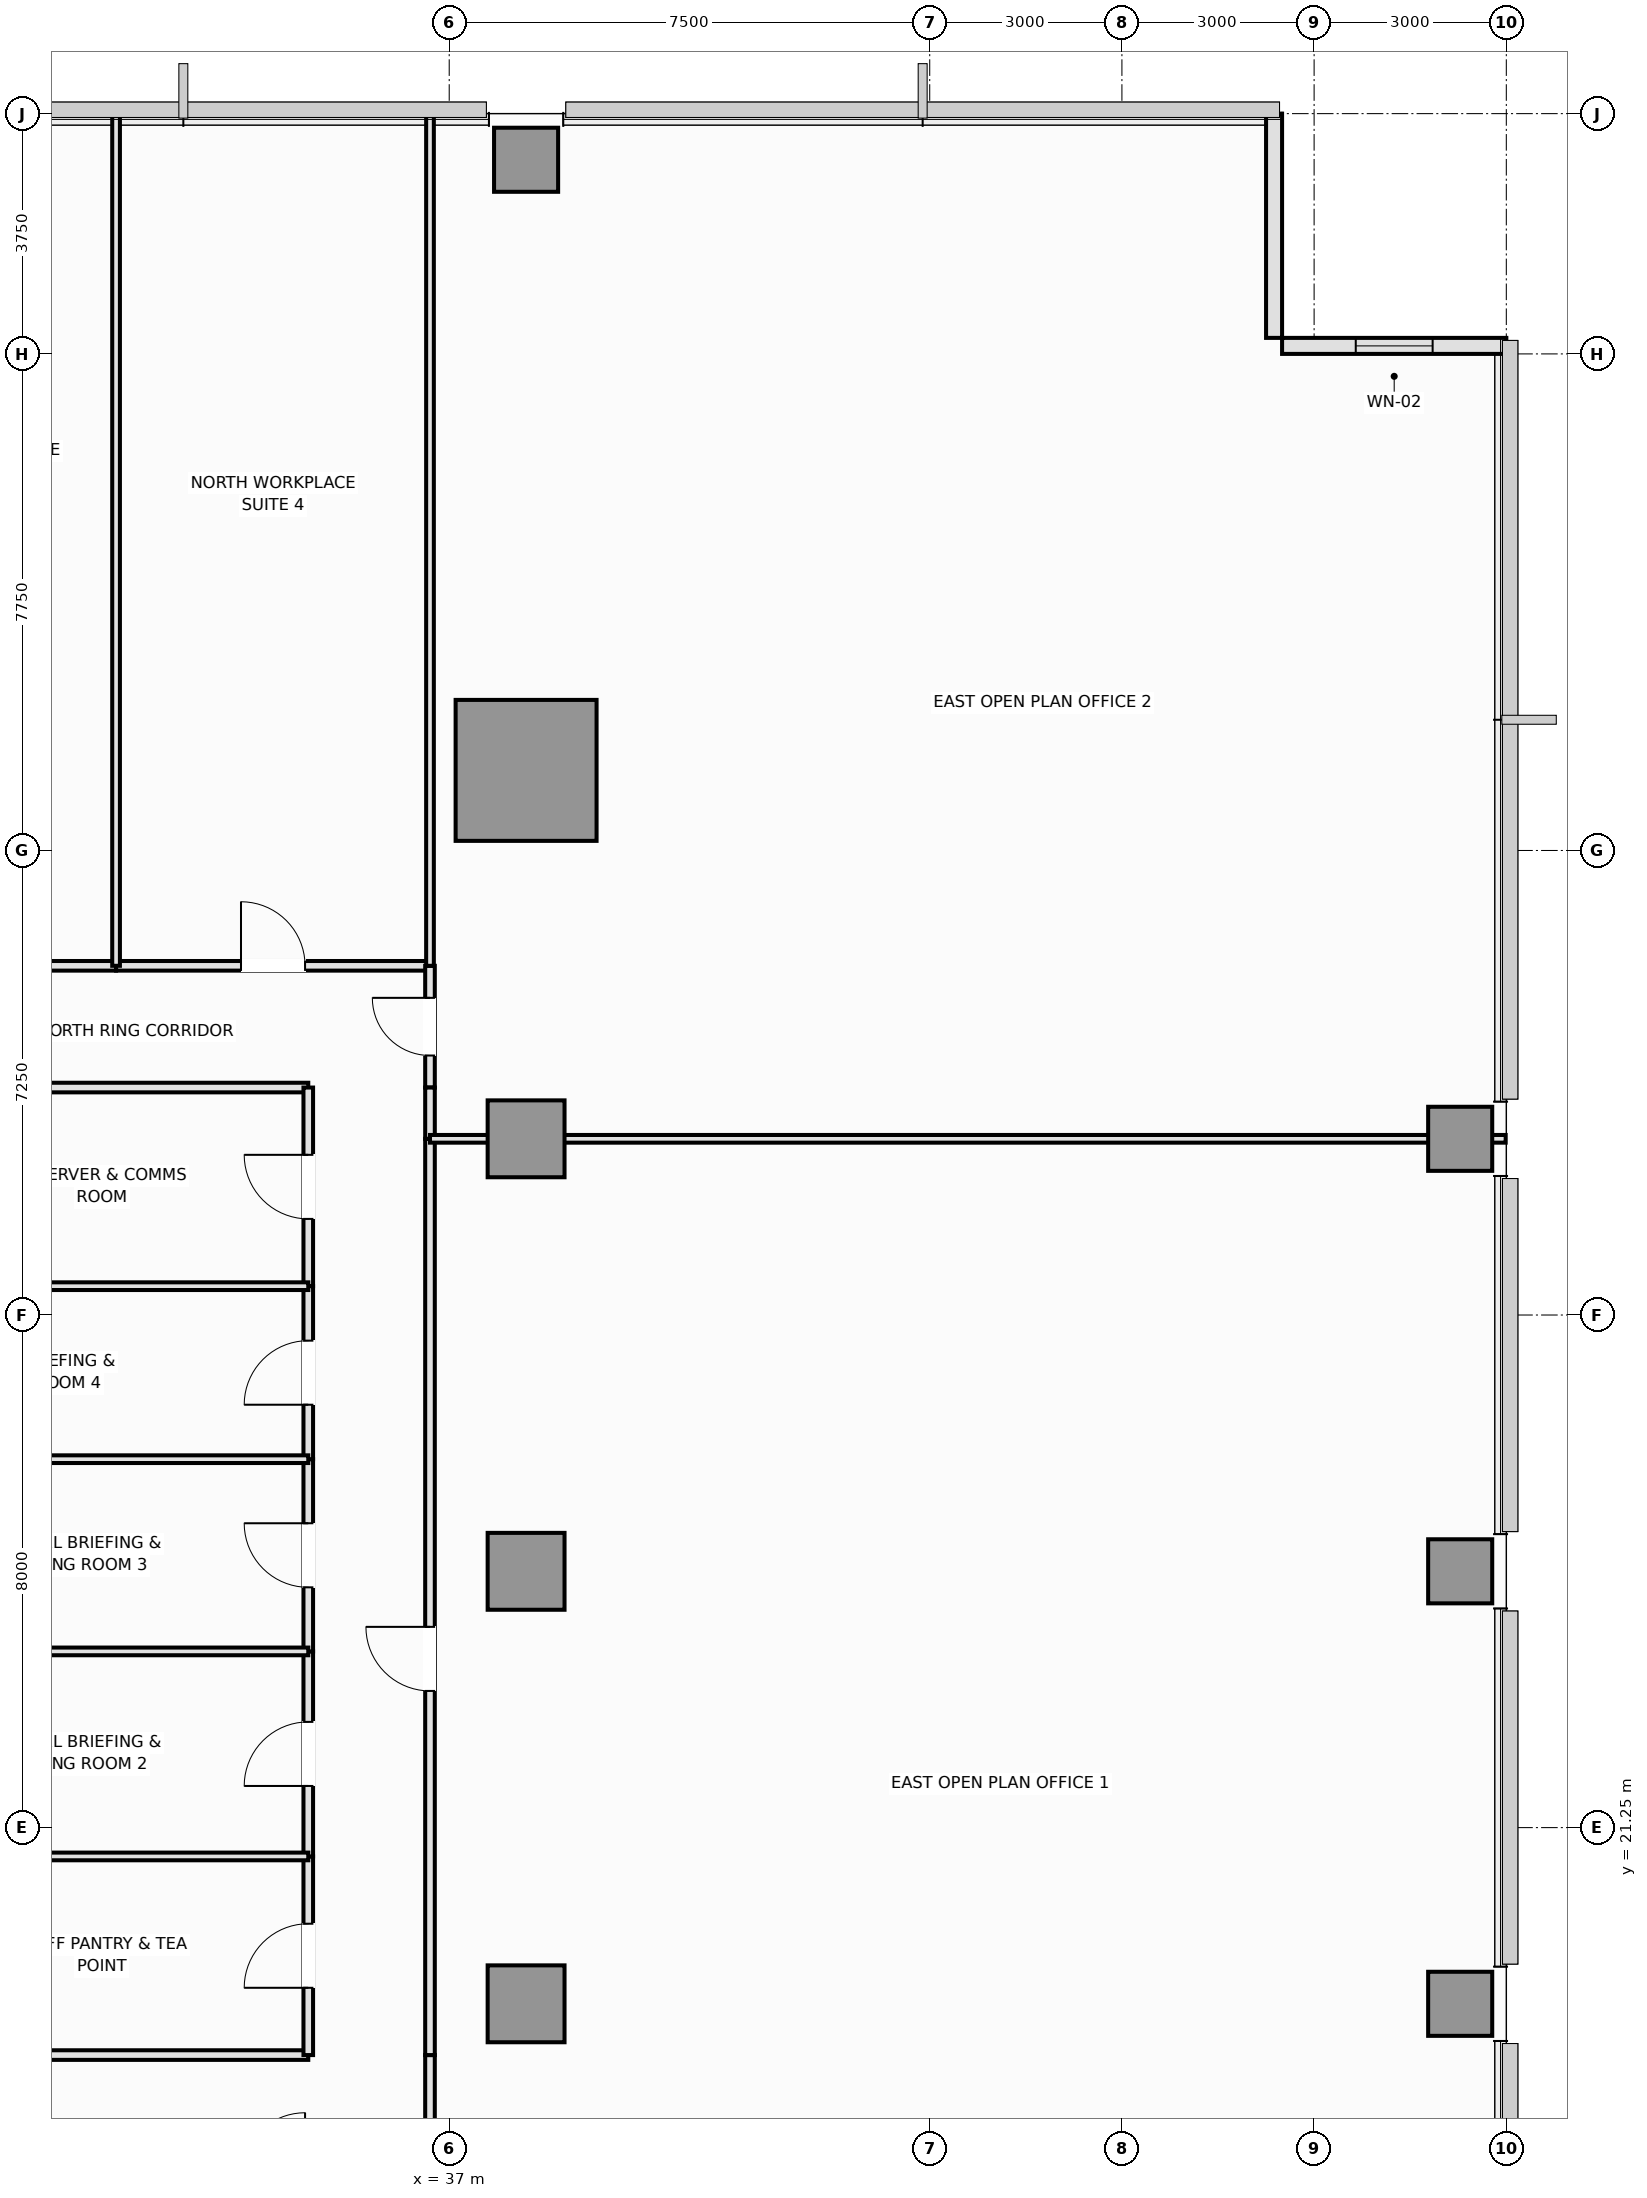
"""IFC4 building model, lengths in metres.
Left out: names, types, materials, properties, quantities, classifications, styles, units other than length and angle.
Written with IfcOpenShell. Run it as: python <this file> out.ifc"""

import sys

from ifc_helpers import new_model, si_unit, direction, frame, frame_2d, origin, origin_2d, place, context, subcontext, project, spatial, rectangle, extrude, element, fill, save


model = new_model("IFC4")
c1 = context("Model", 3, precision=1e-05, world=origin(), true_north=direction((0.0, 1.0)))
c2 = subcontext(c1, "Body", "Model", "MODEL_VIEW")
j1 = project(units=[si_unit("LENGTHUNIT", "METRE"), si_unit("PLANEANGLEUNIT", "RADIAN")], contexts=[c1])
p1 = place(None, origin())
s1 = spatial("IfcSite", under=j1, at=p1, CompositionType="ELEMENT")
p2 = place(p1, origin())
s2 = spatial("IfcBuilding", under=s1, at=p2, CompositionType="ELEMENT")
p3 = place(p2, frame((0.0, 0.0, 68.2)))
s3 = spatial("IfcBuildingStorey", under=s2, at=p3, CompositionType="ELEMENT", Elevation=68.2)
p4 = place(p3, frame((38.2, 37.75, 0.0), z_axis=(0.0, 0.0, 1.0), x_axis=(1.0, 0.0, 0.0)))
e1 = element("IfcColumn", 1, at=p4, inside=s3, PredefinedType="COLUMN", context=c2, shape_type="SweptSolid", body=[
    extrude(rectangle(XDim=2.2, YDim=2.2, at=origin_2d()), origin(), (0.0, 0.0, 1.0), 3.55),
])
for number, where, z_axis, x_axis in (
    (2, (38.2, 18.5, 0.0), (0.0, 0.0, 1.0), (1.0, 0.0, 0.0)),
    (3, (38.2, 25.25, 0.0), (0.0, 0.0, 1.0), (1.0, 0.0, 0.0)),
    (4, (38.2, 32.0, 0.0), (0.0, 0.0, 1.0), (1.0, 0.0, 0.0)),
):
    element("IfcColumn", number, at=place(p3, frame(where, z_axis=z_axis, x_axis=x_axis)), inside=s3, PredefinedType="COLUMN", context=c2, shape_type="SweptSolid", body=[
        extrude(rectangle(XDim=1.2, YDim=1.2, at=origin_2d()), origin(), (0.0, 0.0, 1.0), 3.55),
    ])
for number, where, z_axis, x_axis in (
    (5, (52.78, 18.5, 0.0), (0.0, 0.0, 1.0), (1.0, 0.0, 0.0)),
    (6, (52.78, 25.25, 0.0), (0.0, 0.0, 1.0), (1.0, 0.0, 0.0)),
    (7, (52.78, 32.0, 0.0), (0.0, 0.0, 1.0), (1.0, 0.0, 0.0)),
    (8, (38.2, 47.28, 0.0), (0.0, 0.0, 1.0), (1.0, 0.0, 0.0)),
):
    element("IfcColumn", number, at=place(p3, frame(where, z_axis=z_axis, x_axis=x_axis)), inside=s3, PredefinedType="COLUMN", context=c2, shape_type="SweptSolid", body=[
        extrude(rectangle(XDim=1.0, YDim=1.0, at=origin_2d()), origin(), (0.0, 0.0, 1.0), 3.55),
    ])
p5 = place(p3, frame((53.5, 44.375, 0.0), z_axis=(0.0, 0.0, 1.0), x_axis=(-1.0, 0.0, 0.0)))
e9 = element("IfcWall", 9, at=p5, inside=s3, PredefinedType="SOLIDWALL", context=c2, shape_type="SweptSolid", body=[
    extrude(rectangle(XDim=3.5, YDim=0.25, at=frame_2d((1.75, 0.0))), origin(), (0.0, 0.0, 1.0), 3.37),
])
p6 = place(p5, frame((1.15, 0.0, 0.9)))
e10 = element("IfcOpeningElement", 10, at=p6, cuts=e9, PredefinedType="OPENING", context=c2, shape_type="SweptSolid", body=[
    extrude(rectangle(XDim=1.2, YDim=1.8, at=frame_2d((0.6, 0.9))), frame((0.0, 0.135, 0.0), z_axis=(0.0, -1.0, 0.0), x_axis=(1.0, 0.0, 0.0)), (0.0, 0.0, 1.0), 0.27),
])
p7 = place(p3, frame((49.875, 44.5, 0.0), z_axis=(0.0, 0.0, 1.0), x_axis=(0.0, 1.0, 0.0)))
e11 = element("IfcWall", 11, at=p7, inside=s3, PredefinedType="SOLIDWALL", context=c2, shape_type="SweptSolid", body=[
    extrude(rectangle(XDim=3.5, YDim=0.25, at=frame_2d((1.75, 0.0))), origin(), (0.0, 0.0, 1.0), 3.37),
])
p8 = place(p3, frame((29.8, 17.7, 0.0), z_axis=(0.0, 0.0, 1.0), x_axis=(1.0, 0.0, 0.0)))
e12 = element("IfcWall", 12, at=p8, inside=s3, PredefinedType="PARTITIONING", context=c2, shape_type="SweptSolid", body=[
    extrude(rectangle(XDim=5.0, YDim=0.15, at=frame_2d((2.5, 0.0))), origin(), (0.0, 0.0, 1.0), 3.37),
])
p9 = place(p3, frame((36.7, 15.8, 0.0), z_axis=(0.0, 0.0, 1.0), x_axis=(0.0, 1.0, 0.0)))
e13 = element("IfcWall", 13, at=p9, inside=s3, PredefinedType="PARTITIONING", context=c2, shape_type="SweptSolid", body=[
    extrude(rectangle(XDim=1.9, YDim=0.15, at=frame_2d((0.95, 0.0))), origin(), (0.0, 0.0, 1.0), 3.37),
])
p10 = place(p3, frame((29.8, 32.8, 0.0), z_axis=(0.0, 0.0, 1.0), x_axis=(1.0, 0.0, 0.0)))
e14 = element("IfcWall", 14, at=p10, inside=s3, PredefinedType="PARTITIONING", context=c2, shape_type="SweptSolid", body=[
    extrude(rectangle(XDim=5.0, YDim=0.15, at=frame_2d((2.5, 0.0))), origin(), (0.0, 0.0, 1.0), 3.37),
])
p11 = place(p3, frame((27.5, 34.7, 0.0), z_axis=(0.0, 0.0, 1.0), x_axis=(1.0, 0.0, 0.0)))
e15 = element("IfcWall", 15, at=p11, inside=s3, PredefinedType="PARTITIONING", context=c2, shape_type="SweptSolid", body=[
    extrude(rectangle(XDim=4.3, YDim=0.15, at=frame_2d((2.15, 0.0))), origin(), (0.0, 0.0, 1.0), 3.37),
])
p12 = place(p11, frame((1.65, 0.0, 0.0)))
e16 = element("IfcOpeningElement", 16, at=p12, cuts=e15, PredefinedType="OPENING", context=c2, shape_type="SweptSolid", body=[
    extrude(rectangle(XDim=1.0, YDim=2.15, at=frame_2d((0.5, 1.075))), frame((0.0, 0.085, 0.0), z_axis=(0.0, -1.0, 0.0), x_axis=(1.0, 0.0, 0.0)), (0.0, 0.0, 1.0), 0.17),
])
p13 = place(p3, frame((31.8, 34.7, 0.0), z_axis=(0.0, 0.0, 1.0), x_axis=(1.0, 0.0, 0.0)))
e17 = element("IfcWall", 17, at=p13, inside=s3, PredefinedType="PARTITIONING", context=c2, shape_type="SweptSolid", body=[
    extrude(rectangle(XDim=4.9, YDim=0.15, at=frame_2d((2.45, 0.0))), origin(), (0.0, 0.0, 1.0), 3.37),
])
p14 = place(p13, frame((1.95, 0.0, 0.0)))
e18 = element("IfcOpeningElement", 18, at=p14, cuts=e17, PredefinedType="OPENING", context=c2, shape_type="SweptSolid", body=[
    extrude(rectangle(XDim=1.0, YDim=2.15, at=frame_2d((0.5, 1.075))), frame((0.0, 0.085, 0.0), z_axis=(0.0, -1.0, 0.0), x_axis=(1.0, 0.0, 0.0)), (0.0, 0.0, 1.0), 0.17),
])
p15 = place(p3, frame((36.7, 32.8, 0.0), z_axis=(0.0, 0.0, 1.0), x_axis=(0.0, 1.0, 0.0)))
e19 = element("IfcWall", 19, at=p15, inside=s3, PredefinedType="PARTITIONING", context=c2, shape_type="SweptSolid", body=[
    extrude(rectangle(XDim=1.9, YDim=0.15, at=frame_2d((0.95, 0.0))), origin(), (0.0, 0.0, 1.0), 3.37),
])
p16 = place(p15, frame((0.5, 0.0, 0.0)))
e20 = element("IfcOpeningElement", 20, at=p16, cuts=e19, PredefinedType="OPENING", context=c2, shape_type="SweptSolid", body=[
    extrude(rectangle(XDim=0.9, YDim=2.1, at=frame_2d((0.45, 1.05))), frame((0.0, 0.085, 0.0), z_axis=(0.0, -1.0, 0.0), x_axis=(1.0, 0.0, 0.0)), (0.0, 0.0, 1.0), 0.17),
])
p17 = place(p3, frame((34.8, 17.7, 0.0), z_axis=(0.0, 0.0, 1.0), x_axis=(0.0, 1.0, 0.0)))
e21 = element("IfcWall", 21, at=p17, inside=s3, PredefinedType="PARTITIONING", context=c2, shape_type="SweptSolid", body=[
    extrude(rectangle(XDim=3.1, YDim=0.15, at=frame_2d((1.55, 0.0))), origin(), (0.0, 0.0, 1.0), 3.37),
])
p18 = place(p17, frame((1.05, 0.0, 0.0)))
e22 = element("IfcOpeningElement", 22, at=p18, cuts=e21, PredefinedType="OPENING", context=c2, shape_type="SweptSolid", body=[
    extrude(rectangle(XDim=1.0, YDim=2.15, at=frame_2d((0.5, 1.075))), frame((0.0, 0.085, 0.0), z_axis=(0.0, -1.0, 0.0), x_axis=(1.0, 0.0, 0.0)), (0.0, 0.0, 1.0), 0.17),
])
p19 = place(p3, frame((34.8, 29.7, 0.0), z_axis=(0.0, 0.0, 1.0), x_axis=(0.0, 1.0, 0.0)))
e23 = element("IfcWall", 23, at=p19, inside=s3, PredefinedType="PARTITIONING", context=c2, shape_type="SweptSolid", body=[
    extrude(rectangle(XDim=3.1, YDim=0.15, at=frame_2d((1.55, 0.0))), origin(), (0.0, 0.0, 1.0), 3.37),
])
p20 = place(p19, frame((1.05, 0.0, 0.0)))
e24 = element("IfcOpeningElement", 24, at=p20, cuts=e23, PredefinedType="OPENING", context=c2, shape_type="SweptSolid", body=[
    extrude(rectangle(XDim=1.0, YDim=2.15, at=frame_2d((0.5, 1.075))), frame((0.0, 0.085, 0.0), z_axis=(0.0, -1.0, 0.0), x_axis=(1.0, 0.0, 0.0)), (0.0, 0.0, 1.0), 0.17),
])
p21 = place(p3, frame((34.8, 20.8, 0.0), z_axis=(0.0, 0.0, 1.0), x_axis=(0.0, 1.0, 0.0)))
e25 = element("IfcWall", 25, at=p21, inside=s3, PredefinedType="PARTITIONING", context=c2, shape_type="SweptSolid", body=[
    extrude(rectangle(XDim=3.2, YDim=0.15, at=frame_2d((1.6, 0.0))), origin(), (0.0, 0.0, 1.0), 3.37),
])
p22 = place(p21, frame((1.1, 0.0, 0.0)))
e26 = element("IfcOpeningElement", 26, at=p22, cuts=e25, PredefinedType="OPENING", context=c2, shape_type="SweptSolid", body=[
    extrude(rectangle(XDim=1.0, YDim=2.15, at=frame_2d((0.5, 1.075))), frame((0.0, 0.085, 0.0), z_axis=(0.0, -1.0, 0.0), x_axis=(1.0, 0.0, 0.0)), (0.0, 0.0, 1.0), 0.17),
])
p23 = place(p3, frame((34.8, 24.0, 0.0), z_axis=(0.0, 0.0, 1.0), x_axis=(0.0, 1.0, 0.0)))
e27 = element("IfcWall", 27, at=p23, inside=s3, PredefinedType="PARTITIONING", context=c2, shape_type="SweptSolid", body=[
    extrude(rectangle(XDim=3.0, YDim=0.15, at=frame_2d((1.5, 0.0))), origin(), (0.0, 0.0, 1.0), 3.37),
])
p24 = place(p23, frame((1.0, 0.0, 0.0)))
e28 = element("IfcOpeningElement", 28, at=p24, cuts=e27, PredefinedType="OPENING", context=c2, shape_type="SweptSolid", body=[
    extrude(rectangle(XDim=1.0, YDim=2.15, at=frame_2d((0.5, 1.075))), frame((0.0, 0.085, 0.0), z_axis=(0.0, -1.0, 0.0), x_axis=(1.0, 0.0, 0.0)), (0.0, 0.0, 1.0), 0.17),
])
p25 = place(p3, frame((34.8, 27.0, 0.0), z_axis=(0.0, 0.0, 1.0), x_axis=(0.0, 1.0, 0.0)))
e29 = element("IfcWall", 29, at=p25, inside=s3, PredefinedType="PARTITIONING", context=c2, shape_type="SweptSolid", body=[
    extrude(rectangle(XDim=2.7, YDim=0.15, at=frame_2d((1.35, 0.0))), origin(), (0.0, 0.0, 1.0), 3.37),
])
p26 = place(p25, frame((0.85, 0.0, 0.0)))
e30 = element("IfcOpeningElement", 30, at=p26, cuts=e29, PredefinedType="OPENING", context=c2, shape_type="SweptSolid", body=[
    extrude(rectangle(XDim=1.0, YDim=2.15, at=frame_2d((0.5, 1.075))), frame((0.0, 0.085, 0.0), z_axis=(0.0, -1.0, 0.0), x_axis=(1.0, 0.0, 0.0)), (0.0, 0.0, 1.0), 0.17),
])
p27 = place(p3, frame((36.7, 17.7, 0.0), z_axis=(0.0, 0.0, 1.0), x_axis=(0.0, 1.0, 0.0)))
e31 = element("IfcWall", 31, at=p27, inside=s3, PredefinedType="PARTITIONING", context=c2, shape_type="SweptSolid", body=[
    extrude(rectangle(XDim=14.3, YDim=0.15, at=frame_2d((7.15, 0.0))), origin(), (0.0, 0.0, 1.0), 3.37),
])
p28 = place(p27, frame((5.683, 0.0, 0.0)))
e32 = element("IfcOpeningElement", 32, at=p28, cuts=e31, PredefinedType="OPENING", context=c2, shape_type="SweptSolid", body=[
    extrude(rectangle(XDim=1.0, YDim=2.15, at=frame_2d((0.5, 1.075))), frame((0.0, 0.085, 0.0), z_axis=(0.0, -1.0, 0.0), x_axis=(1.0, 0.0, 0.0)), (0.0, 0.0, 1.0), 0.17),
])
p29 = place(p3, frame((36.7, 32.0, 0.0), z_axis=(0.0, 0.0, 1.0), x_axis=(0.0, 1.0, 0.0)))
e33 = element("IfcWall", 33, at=p29, inside=s3, PredefinedType="PARTITIONING", context=c2, shape_type="SweptSolid", body=[
    extrude(rectangle(XDim=0.8, YDim=0.15, at=frame_2d((0.4, 0.0))), origin(), (0.0, 0.0, 1.0), 3.37),
])
for number, where, z_axis, x_axis in (
    (34, (29.8, 20.8, 0.0), (0.0, 0.0, 1.0), (1.0, 0.0, 0.0)),
    (35, (29.8, 29.7, 0.0), (0.0, 0.0, 1.0), (1.0, 0.0, 0.0)),
):
    element("IfcWall", number, at=place(p3, frame(where, z_axis=z_axis, x_axis=x_axis)), inside=s3, PredefinedType="PARTITIONING", context=c2, shape_type="SweptSolid", body=[
        extrude(rectangle(XDim=5.0, YDim=0.12, at=frame_2d((2.5, 0.0))), origin(), (0.0, 0.0, 1.0), 3.37),
    ])
for number, where, z_axis, x_axis in (
    (36, (27.5, 24.0, 0.0), (0.0, 0.0, 1.0), (1.0, 0.0, 0.0)),
    (37, (27.5, 27.0, 0.0), (0.0, 0.0, 1.0), (1.0, 0.0, 0.0)),
):
    element("IfcWall", number, at=place(p3, frame(where, z_axis=z_axis, x_axis=x_axis)), inside=s3, PredefinedType="PARTITIONING", context=c2, shape_type="SweptSolid", body=[
        extrude(rectangle(XDim=7.3, YDim=0.12, at=frame_2d((3.65, 0.0))), origin(), (0.0, 0.0, 1.0), 3.37),
    ])
for number, where, z_axis, x_axis in (
    (38, (31.8, 34.7, 0.0), (0.0, 0.0, 1.0), (0.0, 1.0, 0.0)),
    (39, (36.7, 34.7, 0.0), (0.0, 0.0, 1.0), (0.0, 1.0, 0.0)),
):
    element("IfcWall", number, at=place(p3, frame(where, z_axis=z_axis, x_axis=x_axis)), inside=s3, PredefinedType="PARTITIONING", context=c2, shape_type="SweptSolid", body=[
        extrude(rectangle(XDim=13.29, YDim=0.12, at=frame_2d((6.645, 0.0))), origin(), (0.0, 0.0, 1.0), 3.37),
    ])
p30 = place(p3, frame((36.7, 32.0, 0.0), z_axis=(0.0, 0.0, 1.0), x_axis=(1.0, 0.0, 0.0)))
e40 = element("IfcWall", 40, at=p30, inside=s3, PredefinedType="PARTITIONING", context=c2, shape_type="SweptSolid", body=[
    extrude(rectangle(XDim=16.79, YDim=0.12, at=frame_2d((8.395, 0.0))), origin(), (0.0, 0.0, 1.0), 2.72),
])
p31 = place(p6, origin())
e41 = element("IfcWindow", 41, at=p31, inside=s3, PartitioningType="SINGLE_PANEL", PredefinedType="WINDOW", context=c2, shape_type="SweptSolid", body=[
    extrude(rectangle(XDim=1.2, YDim=1.8, at=frame_2d((0.6, 0.9))), frame((0.0, 0.03, 0.0), z_axis=(0.0, -1.0, 0.0), x_axis=(1.0, 0.0, 0.0)), (0.0, 0.0, 1.0), 0.06),
])
fill(e10, e41)
p32 = place(p14, origin())
e42 = element("IfcDoor", 42, at=p32, inside=s3, OperationType="SINGLE_SWING_LEFT", PredefinedType="DOOR", context=c2, shape_type="SweptSolid", body=[
    extrude(rectangle(XDim=1.0, YDim=2.15, at=frame_2d((0.5, 1.075))), frame((0.0, 0.025, 0.0), z_axis=(0.0, -1.0, 0.0), x_axis=(1.0, 0.0, 0.0)), (0.0, 0.0, 1.0), 0.05),
])
fill(e18, e42)
p33 = place(p16, origin())
e43 = element("IfcDoor", 43, at=p33, inside=s3, OperationType="SINGLE_SWING_RIGHT", PredefinedType="DOOR", context=c2, shape_type="SweptSolid", body=[
    extrude(rectangle(XDim=0.9, YDim=2.1, at=frame_2d((0.45, 1.05))), frame((0.0, 0.025, 0.0), z_axis=(0.0, -1.0, 0.0), x_axis=(1.0, 0.0, 0.0)), (0.0, 0.0, 1.0), 0.05),
])
fill(e20, e43)
p34 = place(p18, origin())
e44 = element("IfcDoor", 44, at=p34, inside=s3, OperationType="SINGLE_SWING_LEFT", PredefinedType="DOOR", context=c2, shape_type="SweptSolid", body=[
    extrude(rectangle(XDim=1.0, YDim=2.15, at=frame_2d((0.5, 1.075))), frame((0.0, 0.025, 0.0), z_axis=(0.0, -1.0, 0.0), x_axis=(1.0, 0.0, 0.0)), (0.0, 0.0, 1.0), 0.05),
])
fill(e22, e44)
p35 = place(p20, origin())
e45 = element("IfcDoor", 45, at=p35, inside=s3, OperationType="SINGLE_SWING_RIGHT", PredefinedType="DOOR", context=c2, shape_type="SweptSolid", body=[
    extrude(rectangle(XDim=1.0, YDim=2.15, at=frame_2d((0.5, 1.075))), frame((0.0, 0.025, 0.0), z_axis=(0.0, -1.0, 0.0), x_axis=(1.0, 0.0, 0.0)), (0.0, 0.0, 1.0), 0.05),
])
fill(e24, e45)
p36 = place(p22, origin())
e46 = element("IfcDoor", 46, at=p36, inside=s3, OperationType="SINGLE_SWING_LEFT", PredefinedType="DOOR", context=c2, shape_type="SweptSolid", body=[
    extrude(rectangle(XDim=1.0, YDim=2.15, at=frame_2d((0.5, 1.075))), frame((0.0, 0.025, 0.0), z_axis=(0.0, -1.0, 0.0), x_axis=(1.0, 0.0, 0.0)), (0.0, 0.0, 1.0), 0.05),
])
fill(e26, e46)
p37 = place(p24, origin())
e47 = element("IfcDoor", 47, at=p37, inside=s3, OperationType="SINGLE_SWING_RIGHT", PredefinedType="DOOR", context=c2, shape_type="SweptSolid", body=[
    extrude(rectangle(XDim=1.0, YDim=2.15, at=frame_2d((0.5, 1.075))), frame((0.0, 0.025, 0.0), z_axis=(0.0, -1.0, 0.0), x_axis=(1.0, 0.0, 0.0)), (0.0, 0.0, 1.0), 0.05),
])
fill(e28, e47)
p38 = place(p26, origin())
e48 = element("IfcDoor", 48, at=p38, inside=s3, OperationType="SINGLE_SWING_LEFT", PredefinedType="DOOR", context=c2, shape_type="SweptSolid", body=[
    extrude(rectangle(XDim=1.0, YDim=2.15, at=frame_2d((0.5, 1.075))), frame((0.0, 0.025, 0.0), z_axis=(0.0, -1.0, 0.0), x_axis=(1.0, 0.0, 0.0)), (0.0, 0.0, 1.0), 0.05),
])
fill(e30, e48)
p39 = place(p28, origin())
e49 = element("IfcDoor", 49, at=p39, inside=s3, OperationType="SINGLE_SWING_RIGHT", PredefinedType="DOOR", context=c2, shape_type="SweptSolid", body=[
    extrude(rectangle(XDim=1.0, YDim=2.15, at=frame_2d((0.5, 1.075))), frame((0.0, 0.025, 0.0), z_axis=(0.0, -1.0, 0.0), x_axis=(1.0, 0.0, 0.0)), (0.0, 0.0, 1.0), 0.05),
])
fill(e32, e49)
save(model, sys.argv[1])
